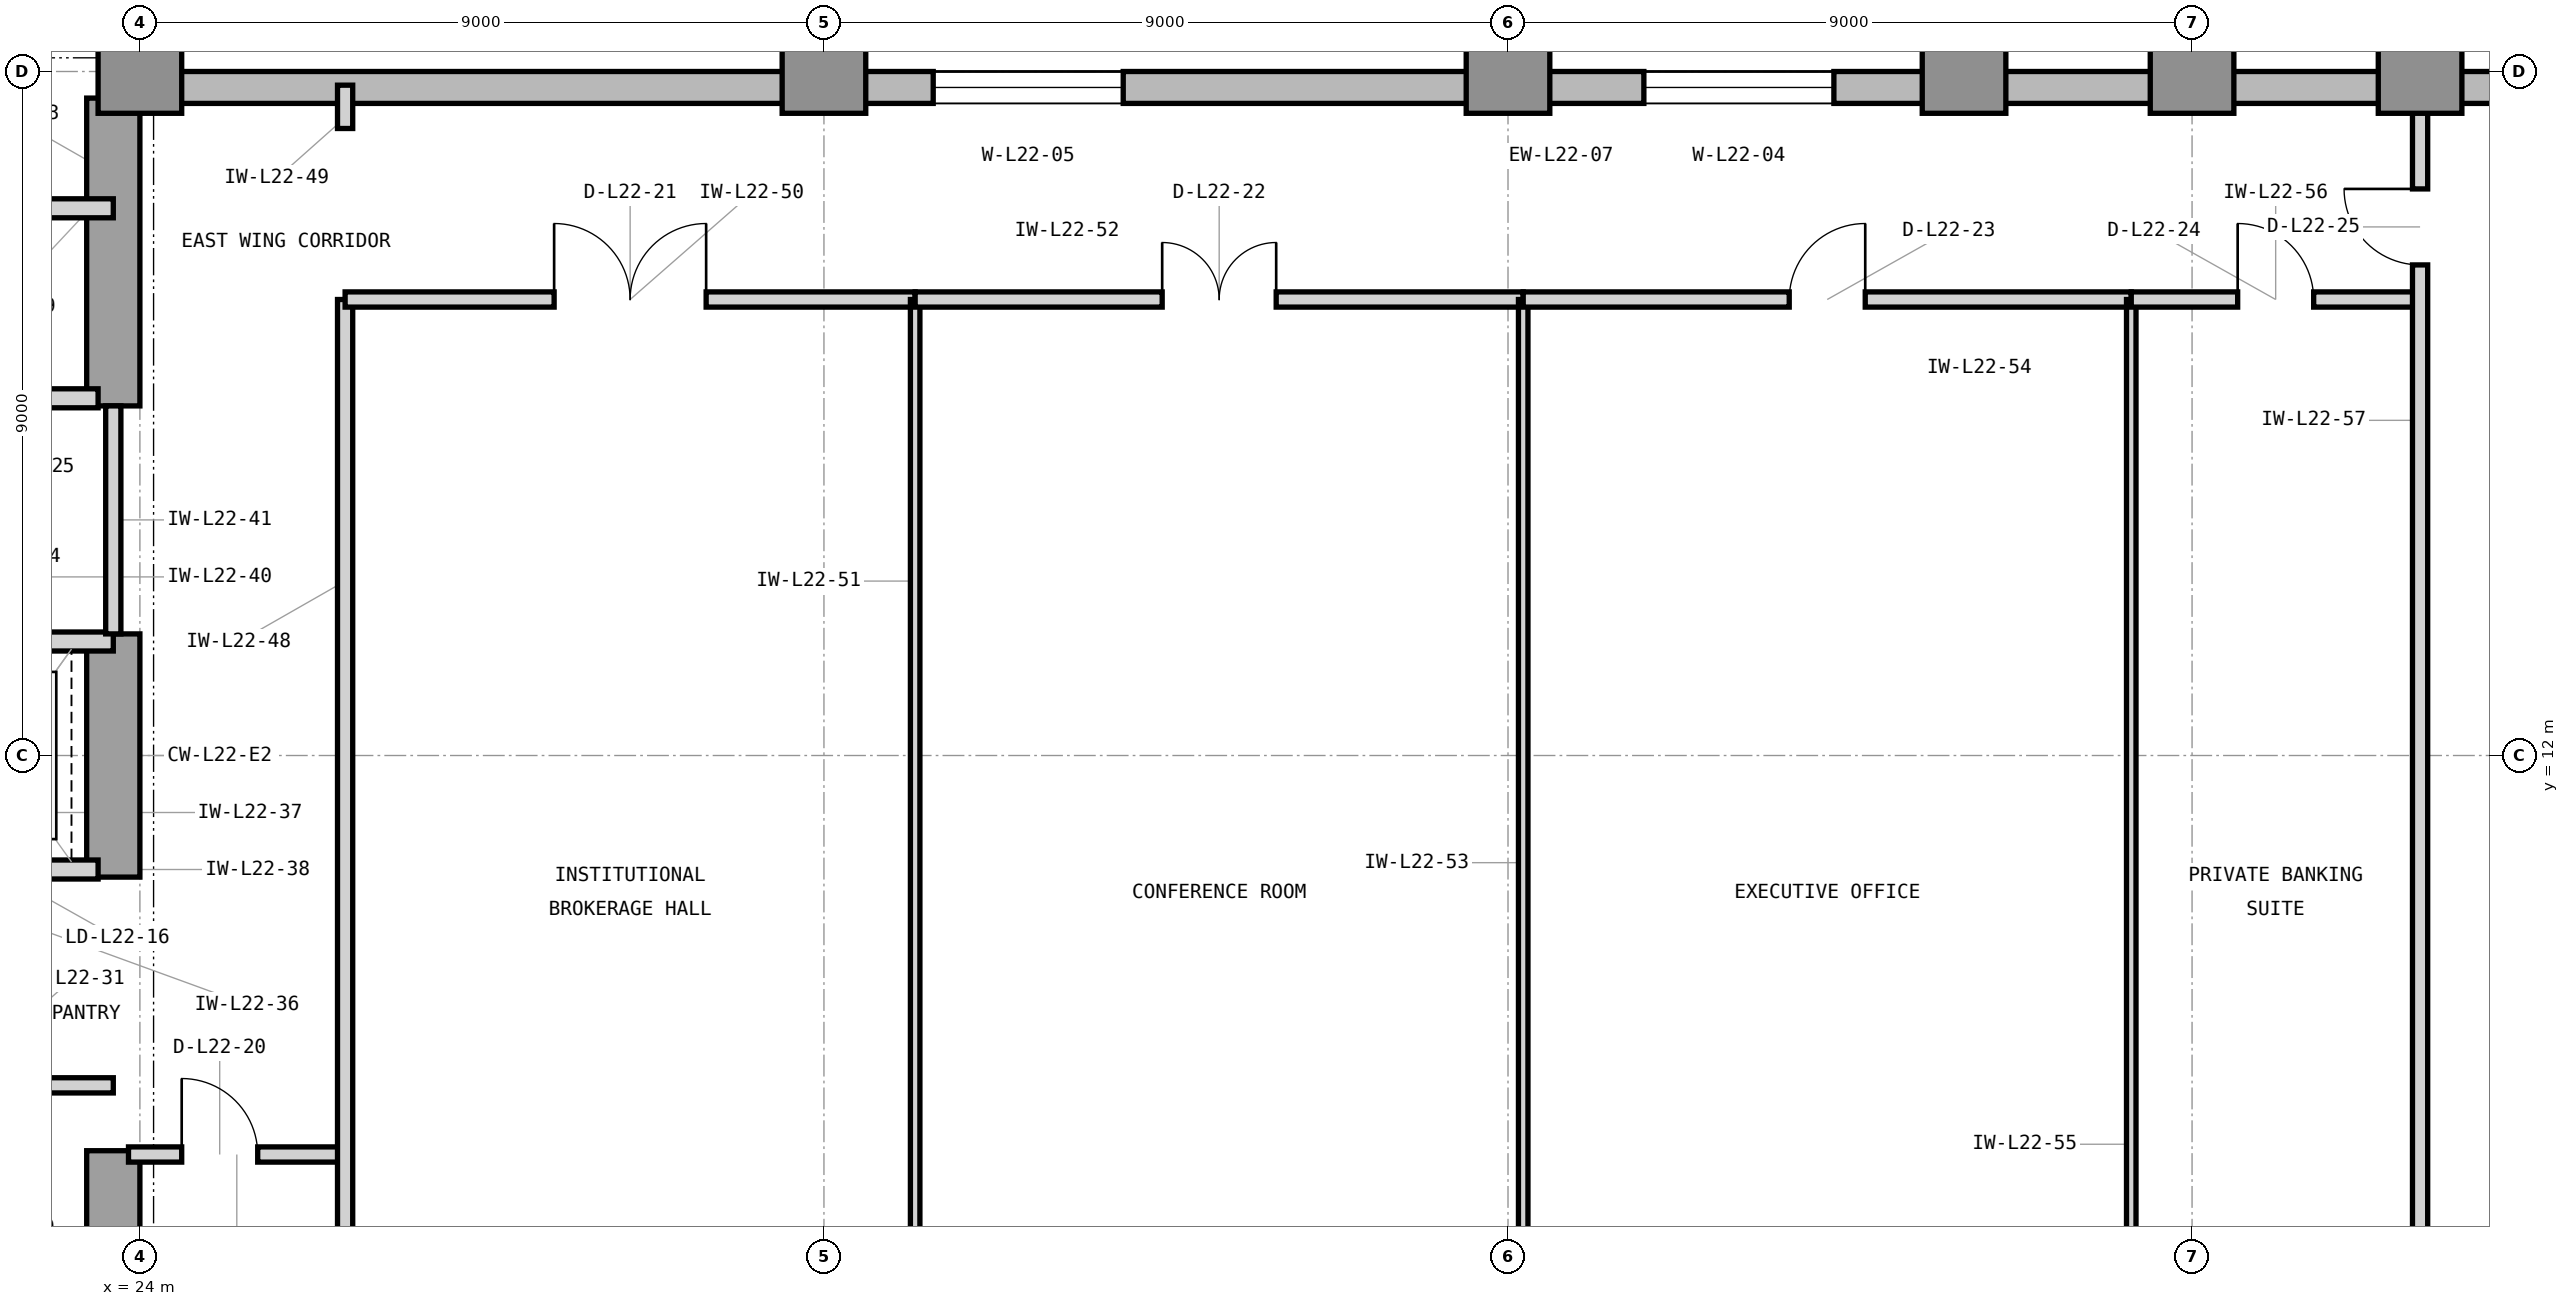
"""IFC4 building model, lengths in metres.
Left out: names, types, materials, properties, quantities, classifications, styles, units other than length and angle.
Written with IfcOpenShell. Run it as: python <this file> out.ifc"""

import sys

from ifc_helpers import new_model, si_unit, direction, frame, frame_2d, origin, origin_2d, place, context, subcontext, project, spatial, rectangle, extrude, element, fill, save


model = new_model("IFC4")
c1 = context("Model", 3, precision=1e-05, world=origin(), true_north=direction((0.0, 1.0)))
c2 = subcontext(c1, "Body", "Model", "MODEL_VIEW")
j1 = project(units=[si_unit("LENGTHUNIT", "METRE"), si_unit("PLANEANGLEUNIT", "RADIAN")], contexts=[c1])
p1 = place(None, origin())
s1 = spatial("IfcSite", under=j1, at=p1, CompositionType="ELEMENT")
p2 = place(p1, origin())
s2 = spatial("IfcBuilding", under=s1, at=p2, CompositionType="ELEMENT")
p3 = place(p2, frame((0.0, 0.0, 97.2)))
s3 = spatial("IfcBuildingStorey", under=s2, at=p3, CompositionType="ELEMENT", Elevation=97.2)
p4 = place(p3, frame((23.65, 3.7, 0.0), z_axis=(0.0, 0.0, 1.0), x_axis=(0.0, 1.0, 0.0)))
e1 = element("IfcWall", 1, at=p4, inside=s3, PredefinedType="SHEAR", context=c2, shape_type="SweptSolid", body=[
    extrude(rectangle(XDim=3.1, YDim=0.7, at=frame_2d((1.55, 0.0))), origin(), (0.0, 0.0, 1.0), 3.9),
])
p5 = place(p3, frame((23.65, 10.4, 0.0), z_axis=(0.0, 0.0, 1.0), x_axis=(0.0, 1.0, 0.0)))
e2 = element("IfcWall", 2, at=p5, inside=s3, PredefinedType="SHEAR", context=c2, shape_type="SweptSolid", body=[
    extrude(rectangle(XDim=3.2, YDim=0.7, at=frame_2d((1.6, 0.0))), origin(), (0.0, 0.0, 1.0), 3.9),
])
p6 = place(p3, frame((23.65, 16.6, 0.0), z_axis=(0.0, 0.0, 1.0), x_axis=(0.0, 1.0, 0.0)))
e3 = element("IfcWall", 3, at=p6, inside=s3, PredefinedType="SHEAR", context=c2, shape_type="SweptSolid", body=[
    extrude(rectangle(XDim=4.05, YDim=0.7, at=frame_2d((2.025, 0.0))), origin(), (0.0, 0.0, 1.0), 3.9),
])
for number, where, z_axis, x_axis in (
    (4, (24.0, 21.0, 0.0), (0.0, 0.0, 1.0), (1.0, 0.0, 0.0)),
    (5, (33.0, 21.0, 0.0), (0.0, 0.0, 1.0), (1.0, 0.0, 0.0)),
    (6, (42.0, 21.0, 0.0), (0.0, 0.0, 1.0), (1.0, 0.0, 0.0)),
    (7, (48.0, 21.0, 0.0), (0.0, 0.0, 1.0), (1.0, 0.0, 0.0)),
    (8, (51.0, 21.0, 0.0), (0.0, 0.0, 1.0), (1.0, 0.0, 0.0)),
    (9, (54.0, 21.0, 0.0), (0.0, 0.0, 1.0), (1.0, 0.0, 0.0)),
):
    element("IfcColumn", number, at=place(p3, frame(where, z_axis=z_axis, x_axis=x_axis)), inside=s3, PredefinedType="COLUMN", context=c2, shape_type="SweptSolid", body=[
        extrude(rectangle(XDim=1.1, YDim=1.1, at=origin_2d()), origin(), (0.0, 0.0, 1.0), 3.9),
    ])
p7 = place(p3, frame((61.4, 20.79, 0.0), z_axis=(0.0, 0.0, 1.0), x_axis=(-1.0, 0.0, 0.0)))
e10 = element("IfcWall", 10, at=p7, inside=s3, PredefinedType="STANDARD", context=c2, shape_type="SweptSolid", body=[
    extrude(rectangle(XDim=37.4, YDim=0.42, at=frame_2d((18.7, 0.0))), origin(), (0.0, 0.0, 1.0), 3.7),
])
p8 = place(p7, frame((15.113, 0.0, 0.85)))
e11 = element("IfcOpeningElement", 11, at=p8, cuts=e10, PredefinedType="OPENING", context=c2, shape_type="SweptSolid", body=[
    extrude(rectangle(XDim=2.5, YDim=2.25, at=frame_2d((1.25, 1.125))), frame((0.0, 0.22, 0.0), z_axis=(0.0, -1.0, 0.0), x_axis=(1.0, 0.0, 0.0)), (0.0, 0.0, 1.0), 0.44),
])
p9 = place(p7, frame((24.462, 0.0, 0.85)))
e12 = element("IfcOpeningElement", 12, at=p9, cuts=e10, PredefinedType="OPENING", context=c2, shape_type="SweptSolid", body=[
    extrude(rectangle(XDim=2.5, YDim=2.25, at=frame_2d((1.25, 1.125))), frame((0.0, 0.22, 0.0), z_axis=(0.0, -1.0, 0.0), x_axis=(1.0, 0.0, 0.0)), (0.0, 0.0, 1.0), 0.44),
])
p10 = place(p3, frame((23.79, 21.0, 0.0), z_axis=(0.0, 0.0, 1.0), x_axis=(0.0, 1.0, 0.0)))
e13 = element("IfcWall", 13, at=p10, inside=s3, PredefinedType="STANDARD", context=c2, shape_type="SweptSolid", body=[
    extrude(rectangle(XDim=25.4, YDim=0.42, at=frame_2d((12.7, 0.0))), origin(), (0.0, 0.0, 1.0), 3.7),
])
p11 = place(p10, frame((11.45, 0.0, 0.85)))
e14 = element("IfcOpeningElement", 14, at=p11, cuts=e13, PredefinedType="OPENING", context=c2, shape_type="SweptSolid", body=[
    extrude(rectangle(XDim=2.5, YDim=2.25, at=frame_2d((1.25, 1.125))), frame((0.0, 0.22, 0.0), z_axis=(0.0, -1.0, 0.0), x_axis=(1.0, 0.0, 0.0)), (0.0, 0.0, 1.0), 0.44),
])
p12 = place(p10, frame((18.866, 0.0, 0.85)))
e15 = element("IfcOpeningElement", 15, at=p12, cuts=e13, PredefinedType="OPENING", context=c2, shape_type="SweptSolid", body=[
    extrude(rectangle(XDim=1.2, YDim=2.25, at=frame_2d((0.6, 1.125))), frame((0.0, 0.22, 0.0), z_axis=(0.0, -1.0, 0.0), x_axis=(1.0, 0.0, 0.0)), (0.0, 0.0, 1.0), 0.44),
])
p13 = place(p3, frame((21.05, 16.7, 0.0), z_axis=(0.0, 0.0, 1.0), x_axis=(1.0, 0.0, 0.0)))
e16 = element("IfcWall", 16, at=p13, inside=s3, PredefinedType="PARTITIONING", context=c2, shape_type="SweptSolid", body=[
    extrude(rectangle(XDim=2.4, YDim=0.25, at=frame_2d((1.2, 0.0))), origin(), (0.0, 0.0, 1.0), 3.227),
])
p14 = place(p3, frame((16.45, 19.2, 0.0), z_axis=(0.0, 0.0, 1.0), x_axis=(1.0, 0.0, 0.0)))
e17 = element("IfcWall", 17, at=p14, inside=s3, PredefinedType="PARTITIONING", context=c2, shape_type="SweptSolid", body=[
    extrude(rectangle(XDim=7.2, YDim=0.25, at=frame_2d((3.6, 0.0))), origin(), (0.0, 0.0, 1.0), 3.69),
])
p15 = place(p3, frame((20.8, 7.66, 0.0), z_axis=(0.0, 0.0, 1.0), x_axis=(1.0, 0.0, 0.0)))
e18 = element("IfcWall", 18, at=p15, inside=s3, PredefinedType="PARTITIONING", context=c2, shape_type="SweptSolid", body=[
    extrude(rectangle(XDim=2.85, YDim=0.2, at=frame_2d((1.425, 0.0))), origin(), (0.0, 0.0, 1.0), 3.69),
])
p16 = place(p15, frame((0.95, 0.0, 0.0)))
e19 = element("IfcOpeningElement", 19, at=p16, cuts=e18, PredefinedType="OPENING", context=c2, shape_type="SweptSolid", body=[
    extrude(rectangle(XDim=0.95, YDim=2.1, at=frame_2d((0.475, 1.05))), frame((0.0, 0.11, 0.0), z_axis=(0.0, -1.0, 0.0), x_axis=(1.0, 0.0, 0.0)), (0.0, 0.0, 1.0), 0.22),
])
p17 = place(p3, frame((21.05, 10.5, 0.0), z_axis=(0.0, 0.0, 1.0), x_axis=(1.0, 0.0, 0.0)))
e20 = element("IfcWall", 20, at=p17, inside=s3, PredefinedType="PARTITIONING", context=c2, shape_type="SweptSolid", body=[
    extrude(rectangle(XDim=2.4, YDim=0.25, at=frame_2d((1.2, 0.0))), origin(), (0.0, 0.0, 1.0), 3.227),
])
p18 = place(p17, frame((0.48, 0.0, 0.0)))
e21 = element("IfcOpeningElement", 21, at=p18, cuts=e20, PredefinedType="OPENING", context=c2, shape_type="SweptSolid", body=[
    extrude(rectangle(XDim=1.15, YDim=2.25, at=frame_2d((0.575, 1.125))), frame((0.0, 0.135, 0.0), z_axis=(0.0, -1.0, 0.0), x_axis=(1.0, 0.0, 0.0)), (0.0, 0.0, 1.0), 0.27),
])
p19 = place(p3, frame((14.7, 13.5, 0.0), z_axis=(0.0, 0.0, 1.0), x_axis=(1.0, 0.0, 0.0)))
e22 = element("IfcWall", 22, at=p19, inside=s3, PredefinedType="PARTITIONING", context=c2, shape_type="SweptSolid", body=[
    extrude(rectangle(XDim=8.95, YDim=0.25, at=frame_2d((4.475, 0.0))), origin(), (0.0, 0.0, 1.0), 3.227),
])
p20 = place(p3, frame((23.65, 13.6, 0.0), z_axis=(0.0, 0.0, 1.0), x_axis=(0.0, 1.0, 0.0)))
e23 = element("IfcWall", 23, at=p20, inside=s3, PredefinedType="PARTITIONING", context=c2, shape_type="SweptSolid", body=[
    extrude(rectangle(XDim=3.0, YDim=0.2, at=frame_2d((1.5, 0.0))), origin(), (0.0, 0.0, 1.0), 3.69),
])
p21 = place(p3, frame((23.85, 6.75, 0.0), z_axis=(0.0, 0.0, 1.0), x_axis=(1.0, 0.0, 0.0)))
e24 = element("IfcWall", 24, at=p21, inside=s3, PredefinedType="PARTITIONING", context=c2, shape_type="SweptSolid", body=[
    extrude(rectangle(XDim=2.85, YDim=0.2, at=frame_2d((1.425, 0.0))), origin(), (0.0, 0.0, 1.0), 3.69),
])
p22 = place(p21, frame((0.7, 0.0, 0.0)))
e25 = element("IfcOpeningElement", 25, at=p22, cuts=e24, PredefinedType="OPENING", context=c2, shape_type="SweptSolid", body=[
    extrude(rectangle(XDim=1.0, YDim=2.15, at=frame_2d((0.5, 1.075))), frame((0.0, 0.11, 0.0), z_axis=(0.0, -1.0, 0.0), x_axis=(1.0, 0.0, 0.0)), (0.0, 0.0, 1.0), 0.22),
])
p23 = place(p3, frame((26.7, 3.18, 0.0), z_axis=(0.0, 0.0, 1.0), x_axis=(0.0, 1.0, 0.0)))
e26 = element("IfcWall", 26, at=p23, inside=s3, PredefinedType="PARTITIONING", context=c2, shape_type="SweptSolid", body=[
    extrude(rectangle(XDim=14.82, YDim=0.2, at=frame_2d((7.41, 0.0))), origin(), (0.0, 0.0, 1.0), 3.69),
])
p24 = place(p3, frame((26.7, 20.25, 0.0), z_axis=(0.0, 0.0, 1.0), x_axis=(0.0, 1.0, 0.0)))
e27 = element("IfcWall", 27, at=p24, inside=s3, PredefinedType="PARTITIONING", context=c2, shape_type="SweptSolid", body=[
    extrude(rectangle(XDim=0.57, YDim=0.2, at=frame_2d((0.285, 0.0))), origin(), (0.0, 0.0, 1.0), 3.69),
])
p25 = place(p3, frame((26.7, 18.0, 0.0), z_axis=(0.0, 0.0, 1.0), x_axis=(1.0, 0.0, 0.0)))
e28 = element("IfcWall", 28, at=p25, inside=s3, PredefinedType="PARTITIONING", context=c2, shape_type="SweptSolid", body=[
    extrude(rectangle(XDim=7.5, YDim=0.2, at=frame_2d((3.75, 0.0))), origin(), (0.0, 0.0, 1.0), 3.227),
])
p26 = place(p25, frame((2.75, 0.0, 0.0)))
e29 = element("IfcOpeningElement", 29, at=p26, cuts=e28, PredefinedType="OPENING", context=c2, shape_type="SweptSolid", body=[
    extrude(rectangle(XDim=2.0, YDim=2.5, at=frame_2d((1.0, 1.25))), frame((0.0, 0.11, 0.0), z_axis=(0.0, -1.0, 0.0), x_axis=(1.0, 0.0, 0.0)), (0.0, 0.0, 1.0), 0.22),
])
p27 = place(p3, frame((34.2, 3.18, 0.0), z_axis=(0.0, 0.0, 1.0), x_axis=(0.0, 1.0, 0.0)))
e30 = element("IfcWall", 30, at=p27, inside=s3, PredefinedType="PARTITIONING", context=c2, shape_type="SweptSolid", body=[
    extrude(rectangle(XDim=14.82, YDim=0.125, at=frame_2d((7.41, 0.0))), origin(), (0.0, 0.0, 1.0), 3.69),
])
p28 = place(p3, frame((34.2, 18.0, 0.0), z_axis=(0.0, 0.0, 1.0), x_axis=(1.0, 0.0, 0.0)))
e31 = element("IfcWall", 31, at=p28, inside=s3, PredefinedType="PARTITIONING", context=c2, shape_type="SweptSolid", body=[
    extrude(rectangle(XDim=8.0, YDim=0.2, at=frame_2d((4.0, 0.0))), origin(), (0.0, 0.0, 1.0), 3.227),
])
p29 = place(p28, frame((3.25, 0.0, 0.0)))
e32 = element("IfcOpeningElement", 32, at=p29, cuts=e31, PredefinedType="OPENING", context=c2, shape_type="SweptSolid", body=[
    extrude(rectangle(XDim=1.5, YDim=2.3, at=frame_2d((0.75, 1.15))), frame((0.0, 0.11, 0.0), z_axis=(0.0, -1.0, 0.0), x_axis=(1.0, 0.0, 0.0)), (0.0, 0.0, 1.0), 0.22),
])
p30 = place(p3, frame((42.2, 3.18, 0.0), z_axis=(0.0, 0.0, 1.0), x_axis=(0.0, 1.0, 0.0)))
e33 = element("IfcWall", 33, at=p30, inside=s3, PredefinedType="PARTITIONING", context=c2, shape_type="SweptSolid", body=[
    extrude(rectangle(XDim=14.82, YDim=0.125, at=frame_2d((7.41, 0.0))), origin(), (0.0, 0.0, 1.0), 3.69),
])
p31 = place(p3, frame((42.2, 18.0, 0.0), z_axis=(0.0, 0.0, 1.0), x_axis=(1.0, 0.0, 0.0)))
e34 = element("IfcWall", 34, at=p31, inside=s3, PredefinedType="PARTITIONING", context=c2, shape_type="SweptSolid", body=[
    extrude(rectangle(XDim=8.0, YDim=0.2, at=frame_2d((4.0, 0.0))), origin(), (0.0, 0.0, 1.0), 3.227),
])
p32 = place(p31, frame((3.5, 0.0, 0.0)))
e35 = element("IfcOpeningElement", 35, at=p32, cuts=e34, PredefinedType="OPENING", context=c2, shape_type="SweptSolid", body=[
    extrude(rectangle(XDim=1.0, YDim=2.15, at=frame_2d((0.5, 1.075))), frame((0.0, 0.11, 0.0), z_axis=(0.0, -1.0, 0.0), x_axis=(1.0, 0.0, 0.0)), (0.0, 0.0, 1.0), 0.22),
])
p33 = place(p3, frame((50.2, 3.18, 0.0), z_axis=(0.0, 0.0, 1.0), x_axis=(0.0, 1.0, 0.0)))
e36 = element("IfcWall", 36, at=p33, inside=s3, PredefinedType="PARTITIONING", context=c2, shape_type="SweptSolid", body=[
    extrude(rectangle(XDim=14.82, YDim=0.125, at=frame_2d((7.41, 0.0))), origin(), (0.0, 0.0, 1.0), 3.69),
])
p34 = place(p3, frame((50.2, 18.0, 0.0), z_axis=(0.0, 0.0, 1.0), x_axis=(1.0, 0.0, 0.0)))
e37 = element("IfcWall", 37, at=p34, inside=s3, PredefinedType="PARTITIONING", context=c2, shape_type="SweptSolid", body=[
    extrude(rectangle(XDim=3.8, YDim=0.2, at=frame_2d((1.9, 0.0))), origin(), (0.0, 0.0, 1.0), 3.227),
])
p35 = place(p34, frame((1.4, 0.0, 0.0)))
e38 = element("IfcOpeningElement", 38, at=p35, cuts=e37, PredefinedType="OPENING", context=c2, shape_type="SweptSolid", body=[
    extrude(rectangle(XDim=1.0, YDim=2.15, at=frame_2d((0.5, 1.075))), frame((0.0, 0.11, 0.0), z_axis=(0.0, -1.0, 0.0), x_axis=(1.0, 0.0, 0.0)), (0.0, 0.0, 1.0), 0.22),
])
p36 = place(p3, frame((54.0, 3.18, 0.0), z_axis=(0.0, 0.0, 1.0), x_axis=(0.0, 1.0, 0.0)))
e39 = element("IfcWall", 39, at=p36, inside=s3, PredefinedType="PARTITIONING", context=c2, shape_type="SweptSolid", body=[
    extrude(rectangle(XDim=17.64, YDim=0.2, at=frame_2d((8.82, 0.0))), origin(), (0.0, 0.0, 1.0), 2.917),
])
p37 = place(p36, frame((15.275, 0.0, 0.0)))
e40 = element("IfcOpeningElement", 40, at=p37, cuts=e39, PredefinedType="OPENING", context=c2, shape_type="SweptSolid", body=[
    extrude(rectangle(XDim=1.0, YDim=2.15, at=frame_2d((0.5, 1.075))), frame((0.0, 0.11, 0.0), z_axis=(0.0, -1.0, 0.0), x_axis=(1.0, 0.0, 0.0)), (0.0, 0.0, 1.0), 0.22),
])
p38 = place(p8, origin())
e41 = element("IfcWindow", 41, at=p38, inside=s3, PartitioningType="SINGLE_PANEL", PredefinedType="WINDOW", context=c2, shape_type="SweptSolid", body=[
    extrude(rectangle(XDim=2.5, YDim=2.25, at=frame_2d((1.25, 1.125))), frame((0.0, 0.11, 0.0), z_axis=(0.0, -1.0, 0.0), x_axis=(1.0, 0.0, 0.0)), (0.0, 0.0, 1.0), 0.06),
])
fill(e11, e41)
p39 = place(p9, origin())
e42 = element("IfcWindow", 42, at=p39, inside=s3, PartitioningType="SINGLE_PANEL", PredefinedType="WINDOW", context=c2, shape_type="SweptSolid", body=[
    extrude(rectangle(XDim=2.5, YDim=2.25, at=frame_2d((1.25, 1.125))), frame((0.0, 0.11, 0.0), z_axis=(0.0, -1.0, 0.0), x_axis=(1.0, 0.0, 0.0)), (0.0, 0.0, 1.0), 0.06),
])
fill(e12, e42)
p40 = place(p22, origin())
e43 = element("IfcDoor", 43, at=p40, inside=s3, OperationType="SINGLE_SWING_LEFT", PredefinedType="DOOR", context=c2, shape_type="SweptSolid", body=[
    extrude(rectangle(XDim=1.0, YDim=2.15, at=frame_2d((0.5, 1.075))), frame((0.0, 0.025, 0.0), z_axis=(0.0, -1.0, 0.0), x_axis=(1.0, 0.0, 0.0)), (0.0, 0.0, 1.0), 0.05),
])
fill(e25, e43)
p41 = place(p26, origin())
e44 = element("IfcDoor", 44, at=p41, inside=s3, OperationType="DOUBLE_DOOR_SINGLE_SWING", PredefinedType="DOOR", context=c2, shape_type="SweptSolid", body=[
    extrude(rectangle(XDim=2.0, YDim=2.5, at=frame_2d((1.0, 1.25))), frame((0.0, 0.025, 0.0), z_axis=(0.0, -1.0, 0.0), x_axis=(1.0, 0.0, 0.0)), (0.0, 0.0, 1.0), 0.05),
])
fill(e29, e44)
p42 = place(p29, origin())
e45 = element("IfcDoor", 45, at=p42, inside=s3, OperationType="DOUBLE_DOOR_SINGLE_SWING", PredefinedType="DOOR", context=c2, shape_type="SweptSolid", body=[
    extrude(rectangle(XDim=1.5, YDim=2.3, at=frame_2d((0.75, 1.15))), frame((0.0, 0.025, 0.0), z_axis=(0.0, -1.0, 0.0), x_axis=(1.0, 0.0, 0.0)), (0.0, 0.0, 1.0), 0.05),
])
fill(e32, e45)
p43 = place(p32, origin())
e46 = element("IfcDoor", 46, at=p43, inside=s3, OperationType="SINGLE_SWING_RIGHT", PredefinedType="DOOR", context=c2, shape_type="SweptSolid", body=[
    extrude(rectangle(XDim=1.0, YDim=2.15, at=frame_2d((0.5, 1.075))), frame((0.0, 0.025, 0.0), z_axis=(0.0, -1.0, 0.0), x_axis=(1.0, 0.0, 0.0)), (0.0, 0.0, 1.0), 0.05),
])
fill(e35, e46)
p44 = place(p35, origin())
e47 = element("IfcDoor", 47, at=p44, inside=s3, OperationType="SINGLE_SWING_LEFT", PredefinedType="DOOR", context=c2, shape_type="SweptSolid", body=[
    extrude(rectangle(XDim=1.0, YDim=2.15, at=frame_2d((0.5, 1.075))), frame((0.0, 0.025, 0.0), z_axis=(0.0, -1.0, 0.0), x_axis=(1.0, 0.0, 0.0)), (0.0, 0.0, 1.0), 0.05),
])
fill(e38, e47)
p45 = place(p37, origin())
e48 = element("IfcDoor", 48, at=p45, inside=s3, OperationType="SINGLE_SWING_RIGHT", PredefinedType="DOOR", context=c2, shape_type="SweptSolid", body=[
    extrude(rectangle(XDim=1.0, YDim=2.15, at=frame_2d((0.5, 1.075))), frame((0.0, 0.025, 0.0), z_axis=(0.0, -1.0, 0.0), x_axis=(1.0, 0.0, 0.0)), (0.0, 0.0, 1.0), 0.05),
])
fill(e40, e48)
save(model, sys.argv[1])
